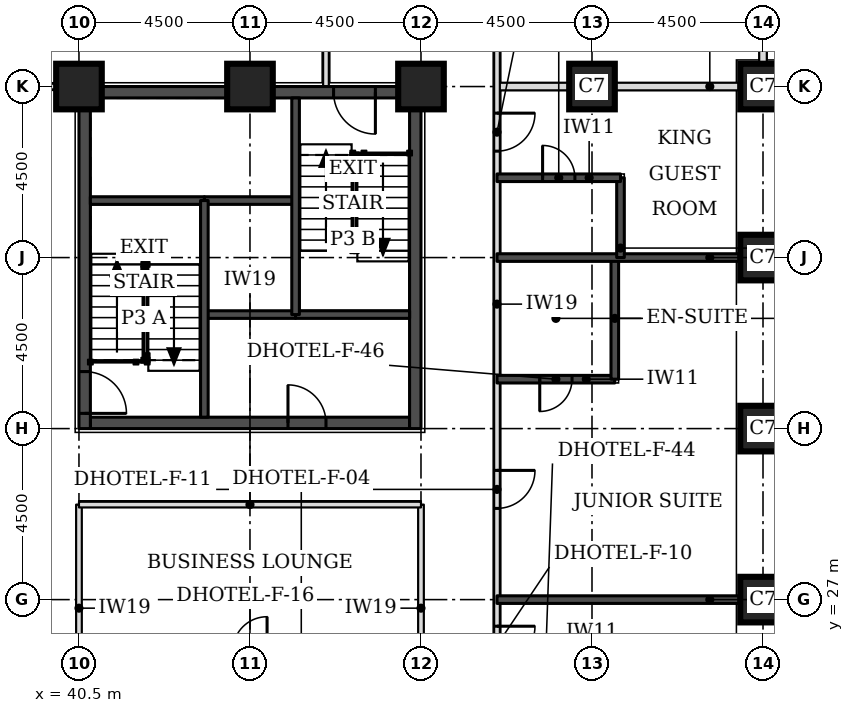
"""IFC4 building model, lengths in metres.
Left out: names, types, materials, properties, quantities, classifications, styles, units other than length and angle.
Written with IfcOpenShell. Run it as: python <this file> out.ifc"""

import sys

from ifc_helpers import new_model, si_unit, direction, frame, frame_2d, origin, origin_2d, place, context, subcontext, project, spatial, rectangle, extrude, element, fill, save


model = new_model("IFC4")
c1 = context("Model", 3, precision=1e-05, world=origin(), true_north=direction((0.0, 1.0)))
c2 = subcontext(c1, "Body", "Model", "MODEL_VIEW")
j1 = project(units=[si_unit("LENGTHUNIT", "METRE"), si_unit("PLANEANGLEUNIT", "RADIAN")], contexts=[c1])
p1 = place(None, origin())
s1 = spatial("IfcSite", under=j1, at=p1, CompositionType="ELEMENT")
p2 = place(p1, origin())
s2 = spatial("IfcBuilding", under=s1, at=p2, CompositionType="ELEMENT")
p3 = place(p2, frame((0.0, 0.0, 42.9)))
s3 = spatial("IfcBuildingStorey", under=s2, at=p3, CompositionType="ELEMENT", Elevation=42.9)
for number, where, z_axis, x_axis in (
    (1, (58.5, 27.0, 0.0), (0.0, 0.0, 1.0), (1.0, 0.0, 0.0)),
    (2, (58.5, 31.5, 0.0), (0.0, 0.0, 1.0), (1.0, 0.0, 0.0)),
    (3, (58.5, 36.0, 0.0), (0.0, 0.0, 1.0), (1.0, 0.0, 0.0)),
    (4, (40.5, 40.5, 0.0), (0.0, 0.0, 1.0), (1.0, 0.0, 0.0)),
    (5, (45.0, 40.5, 0.0), (0.0, 0.0, 1.0), (1.0, 0.0, 0.0)),
    (6, (49.5, 40.5, 0.0), (0.0, 0.0, 1.0), (1.0, 0.0, 0.0)),
    (7, (54.0, 40.5, 0.0), (0.0, 0.0, 1.0), (1.0, 0.0, 0.0)),
    (8, (58.5, 40.5, 0.0), (0.0, 0.0, 1.0), (1.0, 0.0, 0.0)),
):
    element("IfcColumn", number, at=place(p3, frame(where, z_axis=z_axis, x_axis=x_axis)), inside=s3, PredefinedType="COLUMN", context=c2, shape_type="SweptSolid", body=[
        extrude(rectangle(XDim=1.2, YDim=1.2, at=origin_2d()), origin(), (0.0, 0.0, 1.0), 3.3),
    ])
p4 = place(p3, frame((40.8, 31.65, 0.0), z_axis=(0.0, 0.0, 1.0), x_axis=(1.0, 0.0, 0.0)))
e9 = element("IfcWall", 9, at=p4, inside=s3, PredefinedType="SHEAR", context=c2, shape_type="SweptSolid", body=[
    extrude(rectangle(XDim=8.4, YDim=0.3, at=frame_2d((4.2, 0.0))), origin(), (0.0, 0.0, 1.0), 3.3),
])
p5 = place(p4, frame((5.2, 0.0, 0.0)))
e10 = element("IfcOpeningElement", 10, at=p5, cuts=e9, PredefinedType="OPENING", context=c2, shape_type="SweptSolid", body=[
    extrude(rectangle(XDim=1.0, YDim=2.1, at=frame_2d((0.5, 1.05))), frame((0.0, 0.16, 0.0), z_axis=(0.0, -1.0, 0.0), x_axis=(1.0, 0.0, 0.0)), (0.0, 0.0, 1.0), 0.32),
])
p6 = place(p3, frame((40.8, 40.35, 0.0), z_axis=(0.0, 0.0, 1.0), x_axis=(1.0, 0.0, 0.0)))
e11 = element("IfcWall", 11, at=p6, inside=s3, PredefinedType="SHEAR", context=c2, shape_type="SweptSolid", body=[
    extrude(rectangle(XDim=8.4, YDim=0.3, at=frame_2d((4.2, 0.0))), origin(), (0.0, 0.0, 1.0), 3.3),
])
p7 = place(p6, frame((6.4, 0.0, 0.0)))
e12 = element("IfcOpeningElement", 12, at=p7, cuts=e11, PredefinedType="OPENING", context=c2, shape_type="SweptSolid", body=[
    extrude(rectangle(XDim=1.1, YDim=2.1, at=frame_2d((0.55, 1.05))), frame((0.0, 0.16, 0.0), z_axis=(0.0, -1.0, 0.0), x_axis=(1.0, 0.0, 0.0)), (0.0, 0.0, 1.0), 0.32),
])
p8 = place(p3, frame((40.65, 31.5, 0.0), z_axis=(0.0, 0.0, 1.0), x_axis=(0.0, 1.0, 0.0)))
e13 = element("IfcWall", 13, at=p8, inside=s3, PredefinedType="SHEAR", context=c2, shape_type="SweptSolid", body=[
    extrude(rectangle(XDim=9.0, YDim=0.3, at=frame_2d((4.5, 0.0))), origin(), (0.0, 0.0, 1.0), 3.3),
])
p9 = place(p8, frame((0.4, 0.0, 0.0)))
e14 = element("IfcOpeningElement", 14, at=p9, cuts=e13, PredefinedType="OPENING", context=c2, shape_type="SweptSolid", body=[
    extrude(rectangle(XDim=1.1, YDim=2.1, at=frame_2d((0.55, 1.05))), frame((0.0, 0.16, 0.0), z_axis=(0.0, -1.0, 0.0), x_axis=(1.0, 0.0, 0.0)), (0.0, 0.0, 1.0), 0.32),
])
p10 = place(p3, frame((49.35, 31.5, 0.0), z_axis=(0.0, 0.0, 1.0), x_axis=(0.0, 1.0, 0.0)))
e15 = element("IfcWall", 15, at=p10, inside=s3, PredefinedType="SHEAR", context=c2, shape_type="SweptSolid", body=[
    extrude(rectangle(XDim=9.0, YDim=0.3, at=frame_2d((4.5, 0.0))), origin(), (0.0, 0.0, 1.0), 3.3),
])
p11 = place(p3, frame((51.5, 40.5, 0.0), z_axis=(0.0, 0.0, 1.0), x_axis=(1.0, 0.0, 0.0)))
e16 = element("IfcWall", 16, at=p11, inside=s3, PredefinedType="PARTITIONING", context=c2, shape_type="SweptSolid", body=[
    extrude(rectangle(XDim=6.4, YDim=0.2, at=frame_2d((3.2, 0.0))), origin(), (0.0, 0.0, 1.0), 2.33),
])
p12 = place(p3, frame((58.5, 41.1, 0.0), z_axis=(0.0, 0.0, 1.0), x_axis=(0.0, 1.0, 0.0)))
e17 = element("IfcWall", 17, at=p12, inside=s3, PredefinedType="PARTITIONING", context=c2, shape_type="SweptSolid", body=[
    extrude(rectangle(XDim=6.4, YDim=0.2, at=frame_2d((3.2, 0.0))), origin(), (0.0, 0.0, 1.0), 3.08),
])
p13 = place(p3, frame((51.5, 23.65, 0.0), z_axis=(0.0, 0.0, 1.0), x_axis=(0.0, 1.0, 0.0)))
e18 = element("IfcWall", 18, at=p13, inside=s3, PredefinedType="PARTITIONING", context=c2, shape_type="SweptSolid", body=[
    extrude(rectangle(XDim=23.85, YDim=0.15, at=frame_2d((11.925, 0.0))), origin(), (0.0, 0.0, 1.0), 3.08),
])
p14 = place(p13, frame((1.65, 0.0, 0.0)))
e19 = element("IfcOpeningElement", 19, at=p14, cuts=e18, PredefinedType="OPENING", context=c2, shape_type="SweptSolid", body=[
    extrude(rectangle(XDim=1.0, YDim=2.1, at=frame_2d((0.5, 1.05))), frame((0.0, 0.085, 0.0), z_axis=(0.0, -1.0, 0.0), x_axis=(1.0, 0.0, 0.0)), (0.0, 0.0, 1.0), 0.17),
])
p15 = place(p13, frame((5.75, 0.0, 0.0)))
e20 = element("IfcOpeningElement", 20, at=p15, cuts=e18, PredefinedType="OPENING", context=c2, shape_type="SweptSolid", body=[
    extrude(rectangle(XDim=1.0, YDim=2.1, at=frame_2d((0.5, 1.05))), frame((0.0, 0.085, 0.0), z_axis=(0.0, -1.0, 0.0), x_axis=(1.0, 0.0, 0.0)), (0.0, 0.0, 1.0), 0.17),
])
p16 = place(p13, frame((15.15, 0.0, 0.0)))
e21 = element("IfcOpeningElement", 21, at=p16, cuts=e18, PredefinedType="OPENING", context=c2, shape_type="SweptSolid", body=[
    extrude(rectangle(XDim=1.0, YDim=2.1, at=frame_2d((0.5, 1.05))), frame((0.0, 0.085, 0.0), z_axis=(0.0, -1.0, 0.0), x_axis=(1.0, 0.0, 0.0)), (0.0, 0.0, 1.0), 0.17),
])
p17 = place(p13, frame((19.9, 0.0, 0.0)))
e22 = element("IfcOpeningElement", 22, at=p17, cuts=e18, PredefinedType="OPENING", context=c2, shape_type="SweptSolid", body=[
    extrude(rectangle(XDim=0.9, YDim=2.1, at=frame_2d((0.45, 1.05))), frame((0.0, 0.085, 0.0), z_axis=(0.0, -1.0, 0.0), x_axis=(1.0, 0.0, 0.0)), (0.0, 0.0, 1.0), 0.17),
])
for number, where, z_axis, x_axis in (
    (23, (40.5, 25.65, 0.0), (0.0, 0.0, 1.0), (0.0, 1.0, 0.0)),
    (24, (49.5, 25.65, 0.0), (0.0, 0.0, 1.0), (0.0, 1.0, 0.0)),
):
    element("IfcWall", number, at=place(p3, frame(where, z_axis=z_axis, x_axis=x_axis)), inside=s3, PredefinedType="PARTITIONING", context=c2, shape_type="SweptSolid", body=[
        extrude(rectangle(XDim=3.85, YDim=0.15, at=frame_2d((1.925, 0.0))), origin(), (0.0, 0.0, 1.0), 3.08),
    ])
p18 = place(p3, frame((40.5, 29.5, 0.0), z_axis=(0.0, 0.0, 1.0), x_axis=(1.0, 0.0, 0.0)))
e25 = element("IfcWall", 25, at=p18, inside=s3, PredefinedType="PARTITIONING", context=c2, shape_type="SweptSolid", body=[
    extrude(rectangle(XDim=9.0, YDim=0.15, at=frame_2d((4.5, 0.0))), origin(), (0.0, 0.0, 1.0), 3.08),
])
p19 = place(p3, frame((38.5, 40.5, 0.0), z_axis=(0.0, 0.0, 1.0), x_axis=(1.0, 0.0, 0.0)))
e26 = element("IfcWall", 26, at=p19, inside=s3, PredefinedType="PARTITIONING", context=c2, shape_type="SweptSolid", body=[
    extrude(rectangle(XDim=1.95, YDim=0.15, at=frame_2d((0.975, 0.0))), origin(), (0.0, 0.0, 1.0), 2.33),
])
p20 = place(p3, frame((47.0, 40.5, 0.0), z_axis=(0.0, 0.0, 1.0), x_axis=(0.0, 1.0, 0.0)))
e27 = element("IfcWall", 27, at=p20, inside=s3, PredefinedType="PARTITIONING", context=c2, shape_type="SweptSolid", body=[
    extrude(rectangle(XDim=7.0, YDim=0.15, at=frame_2d((3.5, 0.0))), origin(), (0.0, 0.0, 1.0), 3.08),
])
p21 = place(p20, frame((3.05, 0.0, 0.0)))
e28 = element("IfcOpeningElement", 28, at=p21, cuts=e27, PredefinedType="OPENING", context=c2, shape_type="SweptSolid", body=[
    extrude(rectangle(XDim=0.9, YDim=2.1, at=frame_2d((0.45, 1.05))), frame((0.0, 0.085, 0.0), z_axis=(0.0, -1.0, 0.0), x_axis=(1.0, 0.0, 0.0)), (0.0, 0.0, 1.0), 0.17),
])
p22 = place(p3, frame((51.5, 27.0, 0.0), z_axis=(0.0, 0.0, 1.0), x_axis=(1.0, 0.0, 0.0)))
e29 = element("IfcWall", 29, at=p22, inside=s3, PredefinedType="SOLIDWALL", context=c2, shape_type="SweptSolid", body=[
    extrude(rectangle(XDim=6.4, YDim=0.2, at=frame_2d((3.2, 0.0))), origin(), (0.0, 0.0, 1.0), 3.08),
])
p23 = place(p3, frame((51.5, 32.8, 0.0), z_axis=(0.0, 0.0, 1.0), x_axis=(1.0, 0.0, 0.0)))
e30 = element("IfcWall", 30, at=p23, inside=s3, PredefinedType="SOLIDWALL", context=c2, shape_type="SweptSolid", body=[
    extrude(rectangle(XDim=3.1, YDim=0.2, at=frame_2d((1.55, 0.0))), origin(), (0.0, 0.0, 1.0), 3.08),
])
p24 = place(p23, frame((1.125, 0.0, 0.0)))
e31 = element("IfcOpeningElement", 31, at=p24, cuts=e30, PredefinedType="OPENING", context=c2, shape_type="SweptSolid", body=[
    extrude(rectangle(XDim=0.85, YDim=2.1, at=frame_2d((0.425, 1.05))), frame((0.0, 0.11, 0.0), z_axis=(0.0, -1.0, 0.0), x_axis=(1.0, 0.0, 0.0)), (0.0, 0.0, 1.0), 0.22),
])
p25 = place(p3, frame((54.6, 32.8, 0.0), z_axis=(0.0, 0.0, 1.0), x_axis=(0.0, 1.0, 0.0)))
e32 = element("IfcWall", 32, at=p25, inside=s3, PredefinedType="SOLIDWALL", context=c2, shape_type="SweptSolid", body=[
    extrude(rectangle(XDim=3.2, YDim=0.2, at=frame_2d((1.6, 0.0))), origin(), (0.0, 0.0, 1.0), 3.08),
])
p26 = place(p3, frame((51.5, 36.0, 0.0), z_axis=(0.0, 0.0, 1.0), x_axis=(1.0, 0.0, 0.0)))
e33 = element("IfcWall", 33, at=p26, inside=s3, PredefinedType="SOLIDWALL", context=c2, shape_type="SweptSolid", body=[
    extrude(rectangle(XDim=6.4, YDim=0.2, at=frame_2d((3.2, 0.0))), origin(), (0.0, 0.0, 1.0), 3.08),
])
p27 = place(p3, frame((54.75, 36.0, 0.0), z_axis=(0.0, 0.0, 1.0), x_axis=(0.0, 1.0, 0.0)))
e34 = element("IfcWall", 34, at=p27, inside=s3, PredefinedType="SOLIDWALL", context=c2, shape_type="SweptSolid", body=[
    extrude(rectangle(XDim=2.1, YDim=0.2, at=frame_2d((1.05, 0.0))), origin(), (0.0, 0.0, 1.0), 3.08),
])
p28 = place(p3, frame((51.5, 38.1, 0.0), z_axis=(0.0, 0.0, 1.0), x_axis=(1.0, 0.0, 0.0)))
e35 = element("IfcWall", 35, at=p28, inside=s3, PredefinedType="SOLIDWALL", context=c2, shape_type="SweptSolid", body=[
    extrude(rectangle(XDim=3.25, YDim=0.2, at=frame_2d((1.625, 0.0))), origin(), (0.0, 0.0, 1.0), 3.08),
])
p29 = place(p28, frame((1.2, 0.0, 0.0)))
e36 = element("IfcOpeningElement", 36, at=p29, cuts=e35, PredefinedType="OPENING", context=c2, shape_type="SweptSolid", body=[
    extrude(rectangle(XDim=0.85, YDim=2.1, at=frame_2d((0.425, 1.05))), frame((0.0, 0.11, 0.0), z_axis=(0.0, -1.0, 0.0), x_axis=(1.0, 0.0, 0.0)), (0.0, 0.0, 1.0), 0.22),
])
p30 = place(p3, frame((43.8, 34.5, 0.0), z_axis=(0.0, 0.0, 1.0), x_axis=(1.0, 0.0, 0.0)))
e37 = element("IfcWall", 37, at=p30, inside=s3, PredefinedType="SOLIDWALL", context=c2, shape_type="SweptSolid", body=[
    extrude(rectangle(XDim=2.4, YDim=0.2, at=frame_2d((1.2, 0.0))), origin(), (0.0, 0.0, 1.0), 3.08),
])
p31 = place(p3, frame((46.2, 34.5, 0.0), z_axis=(0.0, 0.0, 1.0), x_axis=(1.0, 0.0, 0.0)))
e38 = element("IfcWall", 38, at=p31, inside=s3, PredefinedType="SOLIDWALL", context=c2, shape_type="SweptSolid", body=[
    extrude(rectangle(XDim=3.0, YDim=0.2, at=frame_2d((1.5, 0.0))), origin(), (0.0, 0.0, 1.0), 3.08),
])
p32 = place(p3, frame((43.8, 37.5, 0.0), z_axis=(0.0, 0.0, 1.0), x_axis=(1.0, 0.0, 0.0)))
e39 = element("IfcWall", 39, at=p32, inside=s3, PredefinedType="SOLIDWALL", context=c2, shape_type="SweptSolid", body=[
    extrude(rectangle(XDim=2.4, YDim=0.2, at=frame_2d((1.2, 0.0))), origin(), (0.0, 0.0, 1.0), 3.3),
])
p33 = place(p3, frame((40.8, 37.5, 0.0), z_axis=(0.0, 0.0, 1.0), x_axis=(1.0, 0.0, 0.0)))
e40 = element("IfcWall", 40, at=p33, inside=s3, PredefinedType="SOLIDWALL", context=c2, shape_type="SweptSolid", body=[
    extrude(rectangle(XDim=3.0, YDim=0.2, at=frame_2d((1.5, 0.0))), origin(), (0.0, 0.0, 1.0), 3.08),
])
for number, where, z_axis, x_axis in (
    (41, (43.8, 31.8, 0.0), (0.0, 0.0, 1.0), (0.0, 1.0, 0.0)),
    (42, (46.2, 34.5, 0.0), (0.0, 0.0, 1.0), (0.0, 1.0, 0.0)),
):
    element("IfcWall", number, at=place(p3, frame(where, z_axis=z_axis, x_axis=x_axis)), inside=s3, PredefinedType="SOLIDWALL", context=c2, shape_type="SweptSolid", body=[
        extrude(rectangle(XDim=5.7, YDim=0.2, at=frame_2d((2.85, 0.0))), origin(), (0.0, 0.0, 1.0), 3.08),
    ])
p34 = place(p14, frame((1.0, 0.0, 0.0), z_axis=(0.0, 0.0, 1.0), x_axis=(-1.0, 0.0, 0.0)))
e43 = element("IfcDoor", 43, at=p34, inside=s3, OperationType="SINGLE_SWING_LEFT", PredefinedType="DOOR", context=c2, shape_type="SweptSolid", body=[
    extrude(rectangle(XDim=1.0, YDim=2.1, at=frame_2d((0.5, 1.05))), frame((0.0, 0.025, 0.0), z_axis=(0.0, -1.0, 0.0), x_axis=(1.0, 0.0, 0.0)), (0.0, 0.0, 1.0), 0.05),
])
fill(e19, e43)
p35 = place(p15, frame((1.0, 0.0, 0.0), z_axis=(0.0, 0.0, 1.0), x_axis=(-1.0, 0.0, 0.0)))
e44 = element("IfcDoor", 44, at=p35, inside=s3, OperationType="SINGLE_SWING_LEFT", PredefinedType="DOOR", context=c2, shape_type="SweptSolid", body=[
    extrude(rectangle(XDim=1.0, YDim=2.1, at=frame_2d((0.5, 1.05))), frame((0.0, 0.025, 0.0), z_axis=(0.0, -1.0, 0.0), x_axis=(1.0, 0.0, 0.0)), (0.0, 0.0, 1.0), 0.05),
])
fill(e20, e44)
p36 = place(p24, frame((0.85, 0.0, 0.0), z_axis=(0.0, 0.0, 1.0), x_axis=(-1.0, 0.0, 0.0)))
e45 = element("IfcDoor", 45, at=p36, inside=s3, OperationType="SINGLE_SWING_RIGHT", PredefinedType="DOOR", context=c2, shape_type="SweptSolid", body=[
    extrude(rectangle(XDim=0.85, YDim=2.1, at=frame_2d((0.425, 1.05))), frame((0.0, 0.025, 0.0), z_axis=(0.0, -1.0, 0.0), x_axis=(1.0, 0.0, 0.0)), (0.0, 0.0, 1.0), 0.05),
])
fill(e31, e45)
p37 = place(p16, frame((1.0, 0.0, 0.0), z_axis=(0.0, 0.0, 1.0), x_axis=(-1.0, 0.0, 0.0)))
e46 = element("IfcDoor", 46, at=p37, inside=s3, OperationType="SINGLE_SWING_LEFT", PredefinedType="DOOR", context=c2, shape_type="SweptSolid", body=[
    extrude(rectangle(XDim=1.0, YDim=2.1, at=frame_2d((0.5, 1.05))), frame((0.0, 0.025, 0.0), z_axis=(0.0, -1.0, 0.0), x_axis=(1.0, 0.0, 0.0)), (0.0, 0.0, 1.0), 0.05),
])
fill(e21, e46)
p38 = place(p29, origin())
e47 = element("IfcDoor", 47, at=p38, inside=s3, OperationType="SINGLE_SWING_LEFT", PredefinedType="DOOR", context=c2, shape_type="SweptSolid", body=[
    extrude(rectangle(XDim=0.85, YDim=2.1, at=frame_2d((0.425, 1.05))), frame((0.0, 0.025, 0.0), z_axis=(0.0, -1.0, 0.0), x_axis=(1.0, 0.0, 0.0)), (0.0, 0.0, 1.0), 0.05),
])
fill(e36, e47)
p39 = place(p9, frame((1.1, 0.0, 0.0), z_axis=(0.0, 0.0, 1.0), x_axis=(-1.0, 0.0, 0.0)))
e48 = element("IfcDoor", 48, at=p39, inside=s3, OperationType="SINGLE_SWING_RIGHT", PredefinedType="DOOR", context=c2, shape_type="SweptSolid", body=[
    extrude(rectangle(XDim=1.1, YDim=2.1, at=frame_2d((0.55, 1.05))), frame((0.0, 0.025, 0.0), z_axis=(0.0, -1.0, 0.0), x_axis=(1.0, 0.0, 0.0)), (0.0, 0.0, 1.0), 0.05),
])
fill(e14, e48)
p40 = place(p7, frame((1.1, 0.0, 0.0), z_axis=(0.0, 0.0, 1.0), x_axis=(-1.0, 0.0, 0.0)))
e49 = element("IfcDoor", 49, at=p40, inside=s3, OperationType="SINGLE_SWING_LEFT", PredefinedType="DOOR", context=c2, shape_type="SweptSolid", body=[
    extrude(rectangle(XDim=1.1, YDim=2.1, at=frame_2d((0.55, 1.05))), frame((0.0, 0.025, 0.0), z_axis=(0.0, -1.0, 0.0), x_axis=(1.0, 0.0, 0.0)), (0.0, 0.0, 1.0), 0.05),
])
fill(e12, e49)
p41 = place(p5, origin())
e50 = element("IfcDoor", 50, at=p41, inside=s3, OperationType="SINGLE_SWING_LEFT", PredefinedType="DOOR", context=c2, shape_type="SweptSolid", body=[
    extrude(rectangle(XDim=1.0, YDim=2.1, at=frame_2d((0.5, 1.05))), frame((0.0, 0.025, 0.0), z_axis=(0.0, -1.0, 0.0), x_axis=(1.0, 0.0, 0.0)), (0.0, 0.0, 1.0), 0.05),
])
fill(e10, e50)
save(model, sys.argv[1])
